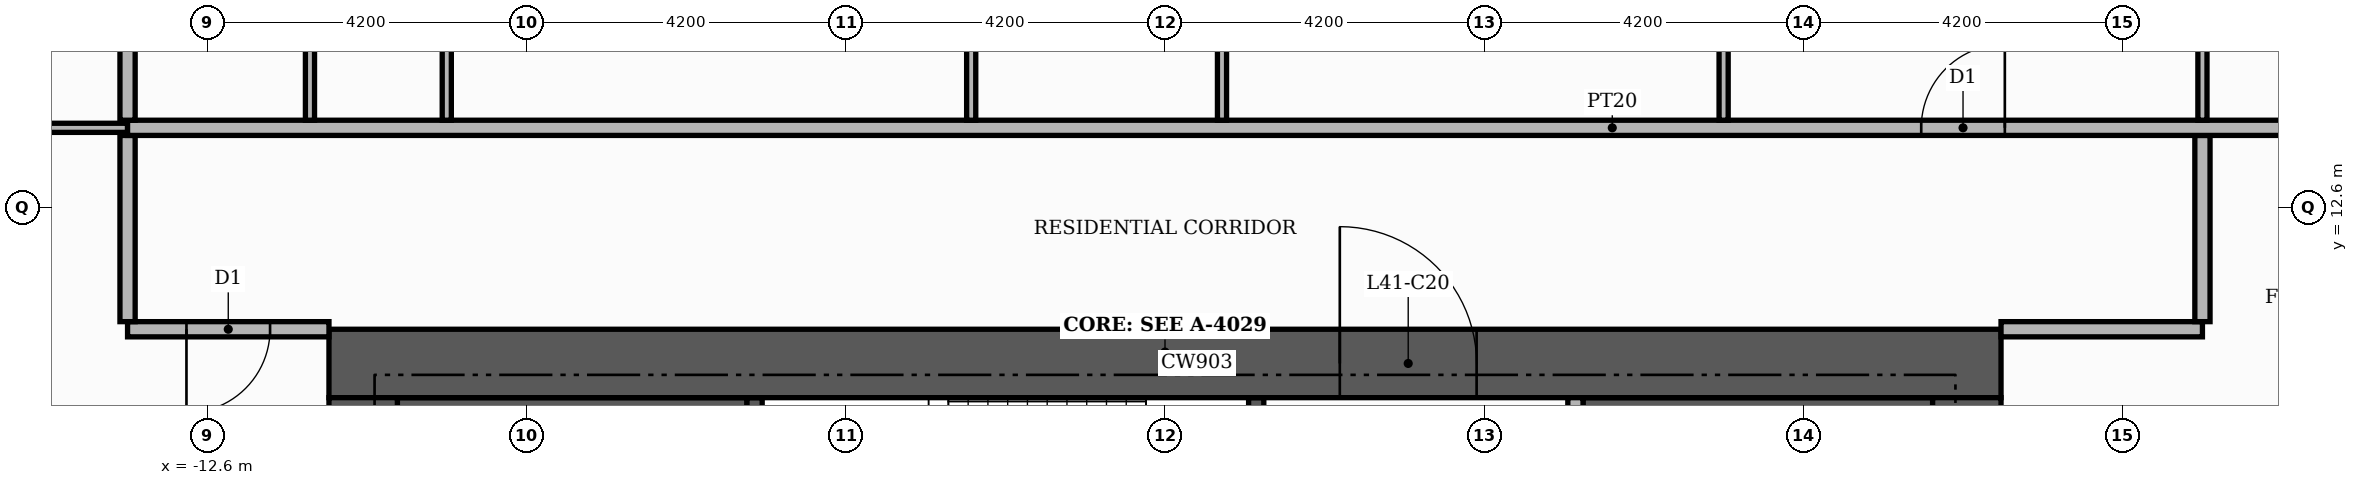
"""IFC4 building model, lengths in metres.
Left out: names, types, materials, properties, quantities, classifications, styles, units other than length and angle.
Written with IfcOpenShell. Run it as: python <this file> out.ifc"""

import sys

from ifc_helpers import new_model, si_unit, direction, frame, frame_2d, origin, place, context, subcontext, project, spatial, rectangle, extrude, element, fill, save


model = new_model("IFC4")
c1 = context("Model", 3, precision=1e-05, world=origin(), true_north=direction((0.0, 1.0)))
c2 = subcontext(c1, "Body", "Model", "MODEL_VIEW")
j1 = project(units=[si_unit("LENGTHUNIT", "METRE"), si_unit("PLANEANGLEUNIT", "RADIAN")], contexts=[c1])
p1 = place(None, origin())
s1 = spatial("IfcSite", under=j1, at=p1, CompositionType="ELEMENT")
p2 = place(p1, origin())
s2 = spatial("IfcBuilding", under=s1, at=p2, CompositionType="ELEMENT")
p3 = place(p2, frame((0.0, 0.0, 172.8)))
s3 = spatial("IfcBuildingStorey", under=s2, at=p3, CompositionType="ELEMENT", Elevation=172.8)
for number, where, z_axis, x_axis in (
    (1, (-10.1, 9.15, 0.0), (0.0, 0.0, 1.0), (1.0, 0.0, 0.0)),
    (2, (5.5, 9.15, 0.0), (0.0, 0.0, 1.0), (1.0, 0.0, 0.0)),
):
    element("IfcWall", number, at=place(p3, frame(where, z_axis=z_axis, x_axis=x_axis)), inside=s3, PredefinedType="SHEAR", context=c2, shape_type="SweptSolid", body=[
        extrude(rectangle(XDim=4.6, YDim=1.9, at=frame_2d((2.3, 0.0))), origin(), (0.0, 0.0, 1.0), 3.48),
    ])
p4 = place(p3, frame((-5.4, 7.25, 0.0), z_axis=(0.0, 0.0, 1.0), x_axis=(0.0, 1.0, 0.0)))
e3 = element("IfcWall", 3, at=p4, inside=s3, PredefinedType="SHEAR", context=c2, shape_type="SweptSolid", body=[
    extrude(rectangle(XDim=2.85, YDim=0.2, at=frame_2d((1.425, 0.0))), origin(), (0.0, 0.0, 1.0), 3.48),
])
p5 = place(p3, frame((1.2, 7.25, 0.0), z_axis=(0.0, 0.0, 1.0), x_axis=(0.0, 1.0, 0.0)))
e4 = element("IfcWall", 4, at=p5, inside=s3, PredefinedType="SHEAR", context=c2, shape_type="SweptSolid", body=[
    extrude(rectangle(XDim=2.85, YDim=0.2, at=frame_2d((1.425, 0.0))), origin(), (0.0, 0.0, 1.0), 3.48),
])
p6 = place(p5, frame((0.85, 0.0, 0.0)))
e5 = element("IfcOpeningElement", 5, at=p6, cuts=e4, PredefinedType="OPENING", context=c2, shape_type="SweptSolid", body=[
    extrude(rectangle(XDim=1.0, YDim=2.1, at=frame_2d((0.5, 1.05))), frame((0.0, 0.11, 0.0), z_axis=(0.0, -1.0, 0.0), x_axis=(1.0, 0.0, 0.0)), (0.0, 0.0, 1.0), 0.22),
])
p7 = place(p3, frame((-11.0, 10.55, 0.0), z_axis=(0.0, 0.0, 1.0), x_axis=(1.0, 0.0, 0.0)))
e6 = element("IfcWall", 6, at=p7, inside=s3, PredefinedType="SHEAR", context=c2, shape_type="SweptSolid", body=[
    extrude(rectangle(XDim=22.0, YDim=0.9, at=frame_2d((11.0, 0.0))), origin(), (0.0, 0.0, 1.0), 3.48),
])
p8 = place(p7, frame((13.3, 0.0, 0.0)))
e7 = element("IfcOpeningElement", 7, at=p8, cuts=e6, PredefinedType="OPENING", context=c2, shape_type="SweptSolid", body=[
    extrude(rectangle(XDim=1.8, YDim=2.2, at=frame_2d((0.9, 1.1))), frame((0.0, 0.46, 0.0), z_axis=(0.0, -1.0, 0.0), x_axis=(1.0, 0.0, 0.0)), (0.0, 0.0, 1.0), 0.92),
])
for number, where, z_axis, x_axis in (
    (8, (-10.55, -10.1, 0.0), (0.0, 0.0, 1.0), (0.0, 1.0, 0.0)),
    (9, (10.55, -10.1, 0.0), (0.0, 0.0, 1.0), (0.0, 1.0, 0.0)),
):
    element("IfcWall", number, at=place(p3, frame(where, z_axis=z_axis, x_axis=x_axis)), inside=s3, PredefinedType="SHEAR", context=c2, shape_type="SweptSolid", body=[
        extrude(rectangle(XDim=20.2, YDim=0.9, at=frame_2d((10.1, 0.0))), origin(), (0.0, 0.0, 1.0), 3.48),
    ])
p9 = place(p3, frame((5.4, 5.5, 0.0), z_axis=(0.0, 0.0, 1.0), x_axis=(0.0, 1.0, 0.0)))
e10 = element("IfcWall", 10, at=p9, inside=s3, PredefinedType="PARTITIONING", context=c2, shape_type="SweptSolid", body=[
    extrude(rectangle(XDim=4.6, YDim=0.2, at=frame_2d((2.3, 0.0))), origin(), (0.0, 0.0, 1.0), 3.48),
])
p10 = place(p9, frame((0.25, 0.0, 0.0)))
e11 = element("IfcOpeningElement", 11, at=p10, cuts=e10, PredefinedType="OPENING", context=c2, shape_type="SweptSolid", body=[
    extrude(rectangle(XDim=1.0, YDim=2.1, at=frame_2d((0.5, 1.05))), frame((0.0, 0.11, 0.0), z_axis=(0.0, -1.0, 0.0), x_axis=(1.0, 0.0, 0.0)), (0.0, 0.0, 1.0), 0.22),
])
p11 = place(p3, frame((-13.65, 11.0, 0.0), z_axis=(0.0, 0.0, 1.0), x_axis=(1.0, 0.0, 0.0)))
e12 = element("IfcWall", 12, at=p11, inside=s3, PredefinedType="PARTITIONING", context=c2, shape_type="SweptSolid", body=[
    extrude(rectangle(XDim=2.65, YDim=0.2, at=frame_2d((1.325, 0.0))), origin(), (0.0, 0.0, 1.0), 3.48),
])
p12 = place(p11, frame((0.775, 0.0, 0.0)))
e13 = element("IfcOpeningElement", 13, at=p12, cuts=e12, PredefinedType="OPENING", context=c2, shape_type="SweptSolid", body=[
    extrude(rectangle(XDim=1.1, YDim=2.4, at=frame_2d((0.55, 1.2))), frame((0.0, 0.11, 0.0), z_axis=(0.0, -1.0, 0.0), x_axis=(1.0, 0.0, 0.0)), (0.0, 0.0, 1.0), 0.22),
])
p13 = place(p3, frame((11.0, 11.0, 0.0), z_axis=(0.0, 0.0, 1.0), x_axis=(1.0, 0.0, 0.0)))
e14 = element("IfcWall", 14, at=p13, inside=s3, PredefinedType="PARTITIONING", context=c2, shape_type="SweptSolid", body=[
    extrude(rectangle(XDim=2.65, YDim=0.2, at=frame_2d((1.325, 0.0))), origin(), (0.0, 0.0, 1.0), 3.48),
])
for number, where, z_axis, x_axis in (
    (15, (-13.65, 11.1, 0.0), (0.0, 0.0, 1.0), (0.0, 1.0, 0.0)),
    (16, (13.65, 11.1, 0.0), (0.0, 0.0, 1.0), (0.0, 1.0, 0.0)),
):
    element("IfcWall", number, at=place(p3, frame(where, z_axis=z_axis, x_axis=x_axis)), inside=s3, PredefinedType="PARTITIONING", context=c2, shape_type="SweptSolid", body=[
        extrude(rectangle(XDim=2.45, YDim=0.2, at=frame_2d((1.225, 0.0))), origin(), (0.0, 0.0, 1.0), 3.48),
    ])
p14 = place(p3, frame((-20.72, 13.65, 0.0), z_axis=(0.0, 0.0, 1.0), x_axis=(1.0, 0.0, 0.0)))
e17 = element("IfcWall", 17, at=p14, inside=s3, PredefinedType="PARTITIONING", context=c2, shape_type="SweptSolid", body=[
    extrude(rectangle(XDim=7.07, YDim=0.12, at=frame_2d((3.535, 0.0))), origin(), (0.0, 0.0, 1.0), 3.48),
])
p15 = place(p14, frame((3.085, 0.0, 0.0)))
e18 = element("IfcOpeningElement", 18, at=p15, cuts=e17, PredefinedType="OPENING", context=c2, shape_type="SweptSolid", body=[
    extrude(rectangle(XDim=0.9, YDim=2.1, at=frame_2d((0.45, 1.05))), frame((0.0, 0.07, 0.0), z_axis=(0.0, -1.0, 0.0), x_axis=(1.0, 0.0, 0.0)), (0.0, 0.0, 1.0), 0.14),
])
p16 = place(p3, frame((-13.65, 13.65, 0.0), z_axis=(0.0, 0.0, 1.0), x_axis=(1.0, 0.0, 0.0)))
e19 = element("IfcWall", 19, at=p16, inside=s3, PredefinedType="PARTITIONING", context=c2, shape_type="SweptSolid", body=[
    extrude(rectangle(XDim=39.07, YDim=0.2, at=frame_2d((19.535, 0.0))), origin(), (0.0, 0.0, 1.0), 3.48),
])
p17 = place(p16, frame((23.6, 0.0, 0.0)))
e20 = element("IfcOpeningElement", 20, at=p17, cuts=e19, PredefinedType="OPENING", context=c2, shape_type="SweptSolid", body=[
    extrude(rectangle(XDim=1.1, YDim=2.4, at=frame_2d((0.55, 1.2))), frame((0.0, 0.11, 0.0), z_axis=(0.0, -1.0, 0.0), x_axis=(1.0, 0.0, 0.0)), (0.0, 0.0, 1.0), 0.22),
])
p18 = place(p3, frame((-13.65, 13.75, 0.0), z_axis=(0.0, 0.0, 1.0), x_axis=(0.0, 1.0, 0.0)))
e21 = element("IfcWall", 21, at=p18, inside=s3, PredefinedType="PARTITIONING", context=c2, shape_type="SweptSolid", body=[
    extrude(rectangle(XDim=6.67, YDim=0.2, at=frame_2d((3.335, 0.0))), origin(), (0.0, 0.0, 1.0), 3.48),
])
for number, where, z_axis, x_axis in (
    (22, (-11.25, 13.75, 0.0), (0.0, 0.0, 1.0), (0.0, 1.0, 0.0)),
    (23, (-9.45, 13.75, 0.0), (0.0, 0.0, 1.0), (0.0, 1.0, 0.0)),
    (24, (-2.55, 13.75, 0.0), (0.0, 0.0, 1.0), (0.0, 1.0, 0.0)),
    (25, (0.75, 13.75, 0.0), (0.0, 0.0, 1.0), (0.0, 1.0, 0.0)),
    (26, (7.35, 13.75, 0.0), (0.0, 0.0, 1.0), (0.0, 1.0, 0.0)),
):
    element("IfcWall", number, at=place(p3, frame(where, z_axis=z_axis, x_axis=x_axis)), inside=s3, PredefinedType="PARTITIONING", context=c2, shape_type="SweptSolid", body=[
        extrude(rectangle(XDim=5.11, YDim=0.12, at=frame_2d((2.555, 0.0))), origin(), (0.0, 0.0, 1.0), 3.48),
    ])
p19 = place(p3, frame((13.65, 13.75, 0.0), z_axis=(0.0, 0.0, 1.0), x_axis=(0.0, 1.0, 0.0)))
e27 = element("IfcWall", 27, at=p19, inside=s3, PredefinedType="PARTITIONING", context=c2, shape_type="SweptSolid", body=[
    extrude(rectangle(XDim=6.669, YDim=0.12, at=frame_2d((3.334, 0.0))), origin(), (0.0, 0.0, 1.0), 3.48),
])
p20 = place(p19, frame((2.834, 0.0, 0.0)))
e28 = element("IfcOpeningElement", 28, at=p20, cuts=e27, PredefinedType="OPENING", context=c2, shape_type="SweptSolid", body=[
    extrude(rectangle(XDim=0.9, YDim=2.1, at=frame_2d((0.45, 1.05))), frame((0.0, 0.07, 0.0), z_axis=(0.0, -1.0, 0.0), x_axis=(1.0, 0.0, 0.0)), (0.0, 0.0, 1.0), 0.14),
])
p21 = place(p8, origin())
e29 = element("IfcDoor", 29, at=p21, inside=s3, OperationType="DOUBLE_DOOR_SINGLE_SWING", PredefinedType="DOOR", context=c2, shape_type="SweptSolid", body=[
    extrude(rectangle(XDim=1.8, YDim=2.2, at=frame_2d((0.9, 1.1))), frame((0.0, 0.025, 0.0), z_axis=(0.0, -1.0, 0.0), x_axis=(1.0, 0.0, 0.0)), (0.0, 0.0, 1.0), 0.05),
])
fill(e7, e29)
p22 = place(p17, origin())
e30 = element("IfcDoor", 30, at=p22, inside=s3, OperationType="SINGLE_SWING_RIGHT", PredefinedType="DOOR", context=c2, shape_type="SweptSolid", body=[
    extrude(rectangle(XDim=1.1, YDim=2.4, at=frame_2d((0.55, 1.2))), frame((0.0, 0.025, 0.0), z_axis=(0.0, -1.0, 0.0), x_axis=(1.0, 0.0, 0.0)), (0.0, 0.0, 1.0), 0.05),
])
fill(e20, e30)
p23 = place(p12, frame((1.1, 0.0, 0.0), z_axis=(0.0, 0.0, 1.0), x_axis=(-1.0, 0.0, 0.0)))
e31 = element("IfcDoor", 31, at=p23, inside=s3, OperationType="SINGLE_SWING_LEFT", PredefinedType="DOOR", context=c2, shape_type="SweptSolid", body=[
    extrude(rectangle(XDim=1.1, YDim=2.4, at=frame_2d((0.55, 1.2))), frame((0.0, 0.025, 0.0), z_axis=(0.0, -1.0, 0.0), x_axis=(1.0, 0.0, 0.0)), (0.0, 0.0, 1.0), 0.05),
])
fill(e13, e31)
save(model, sys.argv[1])
